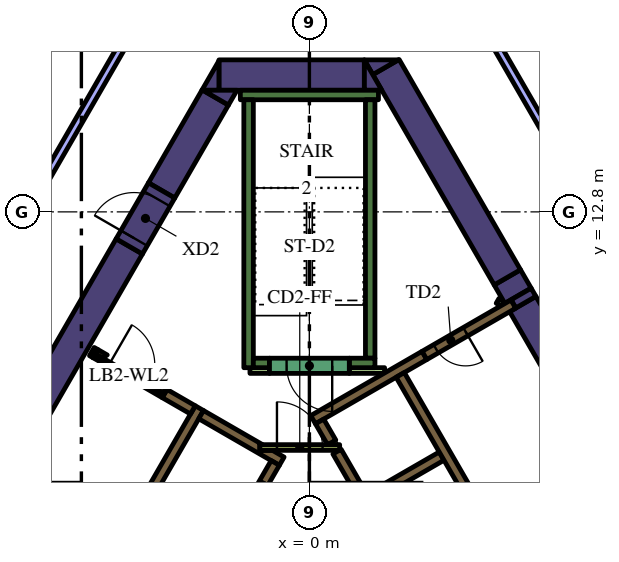
"""IFC4 building model, lengths in metres.
Left out: names, types, materials, properties, quantities, classifications, styles, units other than length and angle.
Written with IfcOpenShell. Run it as: python <this file> out.ifc"""

import sys

from ifc_helpers import new_model, si_unit, direction, frame, frame_2d, origin, place, context, subcontext, project, spatial, polyline, rectangle, outline, extrude, element, fill, save


model = new_model("IFC4")
c1 = context("Model", 3, precision=1e-05, world=origin(), true_north=direction((0.0, 1.0)))
c2 = subcontext(c1, "Body", "Model", "MODEL_VIEW")
j1 = project(units=[si_unit("LENGTHUNIT", "METRE"), si_unit("PLANEANGLEUNIT", "RADIAN")], contexts=[c1])
p1 = place(None, origin())
s1 = spatial("IfcSite", under=j1, at=p1, CompositionType="ELEMENT")
p2 = place(p1, origin())
s2 = spatial("IfcBuilding", under=s1, at=p2, CompositionType="ELEMENT")
p3 = place(p2, frame((0.0, 0.0, 141.6)))
s3 = spatial("IfcBuildingStorey", under=s2, at=p3, CompositionType="ELEMENT", Elevation=141.6)
p4 = place(p3, frame((5.489, 10.594, 0.0), z_axis=(0.0, 0.0, 1.0), x_axis=(-0.500000383388, 0.866025182435, 0.0)))
e1 = element("IfcWall", 1, at=p4, inside=s3, PredefinedType="SOLIDWALL", context=c2, shape_type="SweptSolid", body=[
    extrude(rectangle(XDim=0.558, YDim=0.8, at=frame_2d((0.279, 0.0))), origin(), (0.0, 0.0, 1.0), 4.2),
])
p5 = place(p3, frame((5.615, 10.375, 0.0), z_axis=(0.0, 0.0, 1.0), x_axis=(0.500002746266, -0.866023818221, 0.0)))
e2 = element("IfcWall", 2, at=p5, inside=s3, PredefinedType="SOLIDWALL", context=c2, shape_type="SweptSolid", body=[
    extrude(rectangle(XDim=5.328, YDim=0.8, at=frame_2d((2.664, 0.0))), origin(), (0.0, 0.0, 1.0), 4.2),
])
p6 = place(p3, origin())
e3 = element("IfcWall", 3, at=p6, inside=s3, PredefinedType="SOLIDWALL", context=c2, shape_type="SweptSolid", body=[
    extrude(outline(polyline([(5.432, 10.272), (5.308, 10.487), (5.836, 10.792), (5.96, 10.577), (5.432, 10.272)])), origin(), (0.0, 0.0, 1.0), 4.2),
])
p7 = place(p3, frame((5.209, 11.078, 0.0), z_axis=(0.0, 0.0, 1.0), x_axis=(-0.500035624827, 0.866004834804, 0.0)))
e4 = element("IfcWall", 4, at=p7, inside=s3, PredefinedType="SOLIDWALL", context=c2, shape_type="SweptSolid", body=[
    extrude(rectangle(XDim=6.388, YDim=0.8, at=frame_2d((3.194, 0.0))), origin(), (0.0, 0.0, 1.0), 4.2),
])
e5 = element("IfcWall", 5, at=p6, inside=s3, PredefinedType="SOLIDWALL", context=c2, shape_type="SweptSolid", body=[
    extrude(outline(polyline([(1.443, 16.8), (2.339, 16.8), (1.667, 16.412), (1.443, 16.8)])), origin(), (0.0, 0.0, 1.0), 4.2),
])
p8 = place(p3, frame((-2.379, 16.4, 0.0), z_axis=(0.0, 0.0, 1.0), x_axis=(1.0, 0.0, 0.0)))
e6 = element("IfcWall", 6, at=p8, inside=s3, PredefinedType="SOLIDWALL", context=c2, shape_type="SweptSolid", body=[
    extrude(rectangle(XDim=3.824, YDim=0.8, at=frame_2d((1.912, 0.0))), origin(), (0.0, 0.0, 1.0), 4.2),
])
e7 = element("IfcWall", 7, at=p6, inside=s3, PredefinedType="SOLIDWALL", context=c2, shape_type="SweptSolid", body=[
    extrude(outline(polyline([(1.905, 16.0), (1.447, 16.0), (1.447, 16.793), (1.905, 16.0)])), origin(), (0.0, 0.0, 1.0), 4.2),
])
e8 = element("IfcWall", 8, at=p6, inside=s3, PredefinedType="SOLIDWALL", context=c2, shape_type="SweptSolid", body=[
    extrude(outline(polyline([(-2.829, 16.0), (-2.381, 16.776), (-2.381, 16.0), (-2.829, 16.0)])), origin(), (0.0, 0.0, 1.0), 4.2),
])
p9 = place(p3, frame((-2.477, 15.81, 0.0), z_axis=(0.0, 0.0, 1.0), x_axis=(-0.499969377405, -0.866043083026, 0.0)))
e9 = element("IfcWall", 9, at=p9, inside=s3, PredefinedType="SOLIDWALL", context=c2, shape_type="SweptSolid", body=[
    extrude(rectangle(XDim=2.824, YDim=0.8, at=frame_2d((1.412, 0.0))), origin(), (0.0, 0.0, 1.0), 4.2),
])
e10 = element("IfcWall", 10, at=p6, inside=s3, PredefinedType="SOLIDWALL", context=c2, shape_type="SweptSolid", body=[
    extrude(outline(polyline([(-1.905, 16.0), (-2.129, 15.612), (-2.801, 16.0), (-1.905, 16.0)])), origin(), (0.0, 0.0, 1.0), 4.2),
])
p10 = place(p3, frame((-12.668, -1.842, 0.0), z_axis=(0.0, 0.0, 1.0), x_axis=(0.500003640647, 0.866023301845, 0.0)))
e11 = element("IfcWall", 11, at=p10, inside=s3, PredefinedType="SOLIDWALL", context=c2, shape_type="SweptSolid", body=[
    extrude(rectangle(XDim=15.858, YDim=0.8, at=frame_2d((7.929, 0.0))), origin(), (0.0, 0.0, 1.0), 4.2),
])
p11 = place(p3, frame((-1.817, 15.875, 0.0), z_axis=(0.0, 0.0, 1.0), x_axis=(1.0, 0.0, 0.0)))
e12 = element("IfcWall", 12, at=p11, inside=s3, PredefinedType="SOLIDWALL", context=c2, shape_type="SweptSolid", body=[
    extrude(rectangle(XDim=3.634, YDim=0.25, at=frame_2d((1.817, 0.0))), origin(), (0.0, 0.0, 1.0), 4.2),
])
p12 = place(p3, frame((1.6, 8.95, 0.0), z_axis=(0.0, 0.0, 1.0), x_axis=(0.0, 1.0, 0.0)))
e13 = element("IfcWall", 13, at=p12, inside=s3, PredefinedType="SOLIDWALL", context=c2, shape_type="SweptSolid", body=[
    extrude(rectangle(XDim=6.8, YDim=0.25, at=frame_2d((3.4, 0.0))), origin(), (0.0, 0.0, 1.0), 4.2),
])
p13 = place(p3, frame((1.05, 8.825, 0.0), z_axis=(0.0, 0.0, 1.0), x_axis=(1.0, 0.0, 0.0)))
e14 = element("IfcWall", 14, at=p13, inside=s3, PredefinedType="SOLIDWALL", context=c2, shape_type="SweptSolid", body=[
    extrude(rectangle(XDim=0.675, YDim=0.25, at=frame_2d((0.337, 0.0))), origin(), (0.0, 0.0, 1.0), 4.2),
])
p14 = place(p3, frame((-1.6, 8.7, 0.0), z_axis=(0.0, 0.0, 1.0), x_axis=(0.0, 1.0, 0.0)))
e15 = element("IfcWall", 15, at=p14, inside=s3, PredefinedType="SOLIDWALL", context=c2, shape_type="SweptSolid", body=[
    extrude(rectangle(XDim=7.05, YDim=0.25, at=frame_2d((3.525, 0.0))), origin(), (0.0, 0.0, 1.0), 4.2),
])
p15 = place(p3, frame((-1.475, 8.825, 0.0), z_axis=(0.0, 0.0, 1.0), x_axis=(1.0, 0.0, 0.0)))
e16 = element("IfcWall", 16, at=p15, inside=s3, PredefinedType="SOLIDWALL", context=c2, shape_type="SweptSolid", body=[
    extrude(rectangle(XDim=0.425, YDim=0.25, at=frame_2d((0.212, 0.0))), origin(), (0.0, 0.0, 1.0), 4.2),
])
p16 = place(p3, frame((3.028, 9.023, 0.0), z_axis=(0.0, 0.0, 1.0), x_axis=(-0.866036587186, -0.49998062928, 0.0)))
e17 = element("IfcWall", 17, at=p16, inside=s3, PredefinedType="SOLIDWALL", context=c2, shape_type="SweptSolid", body=[
    extrude(rectangle(XDim=3.384, YDim=0.25, at=frame_2d((1.692, 0.0))), origin(), (0.0, 0.0, 1.0), 4.2),
])
p17 = place(p3, frame((0.268, 7.285, 0.0), z_axis=(0.0, 0.0, 1.0), x_axis=(0.500098681536, -0.865968422476, 0.0)))
e18 = element("IfcWall", 18, at=p17, inside=s3, PredefinedType="SOLIDWALL", context=c2, shape_type="SweptSolid", body=[
    extrude(rectangle(XDim=0.636, YDim=0.25, at=frame_2d((0.318, 0.0))), origin(), (0.0, 0.0, 1.0), 4.2),
])
p18 = place(p3, frame((5.97, -2.591, 0.0), z_axis=(0.0, 0.0, 1.0), x_axis=(-0.499994469932, 0.866028596547, 0.0)))
e19 = element("IfcWall", 19, at=p18, inside=s3, PredefinedType="SOLIDWALL", context=c2, shape_type="SweptSolid", body=[
    extrude(rectangle(XDim=10.488, YDim=0.25, at=frame_2d((5.244, 0.0))), origin(), (0.0, 0.0, 1.0), 4.2),
])
p19 = place(p3, frame((1.574, 5.274, 0.0), z_axis=(0.0, 0.0, 1.0), x_axis=(0.866028486751, 0.499994660107, 0.0)))
e20 = element("IfcWall", 20, at=p19, inside=s3, PredefinedType="SOLIDWALL", context=c2, shape_type="SweptSolid", body=[
    extrude(rectangle(XDim=2.2, YDim=0.25, at=frame_2d((1.1, 0.0))), origin(), (0.0, 0.0, 1.0), 4.2),
])
p20 = place(p3, frame((-8.06, -1.311, 0.0), z_axis=(0.0, 0.0, 1.0), x_axis=(0.50000273126, 0.866023826885, 0.0)))
e21 = element("IfcWall", 21, at=p20, inside=s3, PredefinedType="SOLIDWALL", context=c2, shape_type="SweptSolid", body=[
    extrude(rectangle(XDim=10.33, YDim=0.25, at=frame_2d((5.165, 0.0))), origin(), (0.0, 0.0, 1.0), 4.2),
])
e22 = element("IfcWall", 22, at=p6, inside=s3, PredefinedType="SOLIDWALL", context=c2, shape_type="SweptSolid", body=[
    extrude(outline(polyline([(-2.912, 7.356), (-2.787, 7.573), (-1.232, 6.675), (-1.303, 6.675), (-1.304, 6.675), (-1.304, 6.675), (-1.304, 6.525), (-1.304, 6.525), (-1.303, 6.525), (-0.971, 6.525), (-0.665, 6.348), (-0.79, 6.132), (-1.007, 6.257), (-1.007, 6.257), (-2.912, 7.356)])), origin(), (0.0, 0.0, 1.0), 4.2),
])
p21 = place(p3, frame((-5.725, 9.125, 0.0), z_axis=(0.0, 0.0, 1.0), x_axis=(0.866185586049, -0.49972245349, 0.0)))
e23 = element("IfcWall", 23, at=p21, inside=s3, PredefinedType="SOLIDWALL", context=c2, shape_type="SweptSolid", body=[
    extrude(rectangle(XDim=0.11, YDim=0.25, at=frame_2d((0.055, 0.0))), origin(), (0.0, 0.0, 1.0), 4.2),
])
p22 = place(p3, frame((-3.066, 7.59, 0.0), z_axis=(0.0, 0.0, 1.0), x_axis=(-0.866081358704, 0.49990307071, 0.0)))
e24 = element("IfcWall", 24, at=p22, inside=s3, PredefinedType="SOLIDWALL", context=c2, shape_type="SweptSolid", body=[
    extrude(rectangle(XDim=0.858, YDim=0.25, at=frame_2d((0.429, 0.0))), origin(), (0.0, 0.0, 1.0), 4.2),
])
e25 = element("IfcWall", 25, at=p6, inside=s3, PredefinedType="SOLIDWALL", context=c2, shape_type="SweptSolid", body=[
    extrude(outline(polyline([(-3.748, 8.128), (-3.813, 8.015), (-4.027, 8.139), (-4.017, 8.156), (-4.008, 8.173), (-4.0, 8.192), (-3.995, 8.21), (-3.991, 8.23), (-3.99, 8.25), (-3.99, 8.268), (-3.748, 8.128)])), origin(), (0.0, 0.0, 1.0), 4.2),
])
e26 = element("IfcWall", 26, at=p6, inside=s3, PredefinedType="SOLIDWALL", context=c2, shape_type="SweptSolid", body=[
    extrude(outline(polyline([(-5.689, 8.96), (-5.69, 8.961), (-5.565, 9.177), (-5.319, 9.035), (-5.335, 9.026), (-5.351, 9.015), (-5.366, 9.002), (-5.379, 8.988), (-5.392, 8.972), (-5.402, 8.956), (-5.412, 8.939), (-5.629, 9.064), (-5.629, 9.064), (-5.689, 8.96)])), origin(), (0.0, 0.0, 1.0), 4.2),
])
p23 = place(p3, frame((1.05, 8.625, 0.0), z_axis=(0.0, 0.0, 1.0), x_axis=(1.0, 0.0, 0.0)))
e27 = element("IfcWall", 27, at=p23, inside=s3, PredefinedType="PARTITIONING", context=c2, shape_type="SweptSolid", body=[
    extrude(rectangle(XDim=0.929, YDim=0.15, at=frame_2d((0.464, 0.0))), origin(), (0.0, 0.0, 1.0), 3.15),
])
p24 = place(p3, frame((-1.564, 8.625, 0.0), z_axis=(0.0, 0.0, 1.0), x_axis=(1.0, 0.0, 0.0)))
e28 = element("IfcWall", 28, at=p24, inside=s3, PredefinedType="PARTITIONING", context=c2, shape_type="SweptSolid", body=[
    extrude(rectangle(XDim=0.514, YDim=0.15, at=frame_2d((0.257, 0.0))), origin(), (0.0, 0.0, 1.0), 3.15),
])
p25 = place(p3, frame((4.98, 10.358, 0.0), z_axis=(0.0, 0.0, 1.0), x_axis=(0.500640202437, 0.86565546709, 0.0)))
e29 = element("IfcWall", 29, at=p25, inside=s3, PredefinedType="PARTITIONING", context=c2, shape_type="SweptSolid", body=[
    extrude(rectangle(XDim=0.146, YDim=0.15, at=frame_2d((0.073, 0.0))), origin(), (0.0, 0.0, 1.0), 3.15),
])
p26 = place(p3, frame((8.565, -2.185, 0.0), z_axis=(0.0, 0.0, 1.0), x_axis=(-0.499997954832, 0.866026584559, 0.0)))
e30 = element("IfcWall", 30, at=p26, inside=s3, PredefinedType="SOLIDWALL", context=c2, shape_type="SweptSolid", body=[
    extrude(rectangle(XDim=12.35, YDim=0.25, at=frame_2d((6.175, 0.0))), origin(), (0.0, 0.0, 1.0), 4.2),
])
p27 = place(p26, frame((0.585, 0.0, 0.0)))
e31 = element("IfcOpeningElement", 31, at=p27, cuts=e30, PredefinedType="OPENING", context=c2, shape_type="SweptSolid", body=[
    extrude(rectangle(XDim=1.1, YDim=2.1, at=frame_2d((0.55, 1.05))), frame((0.0, 0.135, 0.0), z_axis=(0.0, -1.0, 0.0), x_axis=(1.0, 0.0, 0.0)), (0.0, 0.0, 1.0), 0.27),
])
p28 = place(p3, frame((-0.898, 6.194, 0.0), z_axis=(0.0, 0.0, 1.0), x_axis=(-0.499996202215, -0.866027596426, 0.0)))
e32 = element("IfcWall", 32, at=p28, inside=s3, PredefinedType="SOLIDWALL", context=c2, shape_type="SweptSolid", body=[
    extrude(rectangle(XDim=9.83, YDim=0.25, at=frame_2d((4.915, 0.0))), origin(), (0.0, 0.0, 1.0), 4.2),
])
p29 = place(p28, frame((0.585, 0.0, 0.0)))
e33 = element("IfcOpeningElement", 33, at=p29, cuts=e32, PredefinedType="OPENING", context=c2, shape_type="SweptSolid", body=[
    extrude(rectangle(XDim=1.1, YDim=2.1, at=frame_2d((0.55, 1.05))), frame((0.0, 0.135, 0.0), z_axis=(0.0, -1.0, 0.0), x_axis=(1.0, 0.0, 0.0)), (0.0, 0.0, 1.0), 0.27),
])
p30 = place(p28, frame((3.105, 0.0, 0.0)))
e34 = element("IfcOpeningElement", 34, at=p30, cuts=e32, PredefinedType="OPENING", context=c2, shape_type="SweptSolid", body=[
    extrude(rectangle(XDim=1.1, YDim=2.1, at=frame_2d((0.55, 1.05))), frame((0.0, 0.135, 0.0), z_axis=(0.0, -1.0, 0.0), x_axis=(1.0, 0.0, 0.0)), (0.0, 0.0, 1.0), 0.27),
])
p31 = place(p28, frame((5.625, 0.0, 0.0)))
e35 = element("IfcOpeningElement", 35, at=p31, cuts=e32, PredefinedType="OPENING", context=c2, shape_type="SweptSolid", body=[
    extrude(rectangle(XDim=1.1, YDim=2.1, at=frame_2d((0.55, 1.05))), frame((0.0, 0.135, 0.0), z_axis=(0.0, -1.0, 0.0), x_axis=(1.0, 0.0, 0.0)), (0.0, 0.0, 1.0), 0.27),
])
p32 = place(p28, frame((8.145, 0.0, 0.0)))
e36 = element("IfcOpeningElement", 36, at=p32, cuts=e32, PredefinedType="OPENING", context=c2, shape_type="SweptSolid", body=[
    extrude(rectangle(XDim=1.1, YDim=2.1, at=frame_2d((0.55, 1.05))), frame((0.0, 0.135, 0.0), z_axis=(0.0, -1.0, 0.0), x_axis=(1.0, 0.0, 0.0)), (0.0, 0.0, 1.0), 0.27),
])
p33 = place(p3, frame((1.05, 8.75, 0.0), z_axis=(0.0, 0.0, 1.0), x_axis=(-1.0, 0.0, 0.0)))
e37 = element("IfcWall", 37, at=p33, inside=s3, PredefinedType="SOLIDWALL", context=c2, shape_type="SweptSolid", body=[
    extrude(rectangle(XDim=2.1, YDim=0.4, at=frame_2d((1.05, 0.0))), origin(), (0.0, 0.0, 1.0), 4.2),
])
p34 = place(p33, frame((0.45, 0.0, 0.0)))
e38 = element("IfcOpeningElement", 38, at=p34, cuts=e37, PredefinedType="OPENING", context=c2, shape_type="SweptSolid", body=[
    extrude(rectangle(XDim=1.2, YDim=2.1, at=frame_2d((0.6, 1.05))), frame((0.0, 0.21, 0.0), z_axis=(0.0, -1.0, 0.0), x_axis=(1.0, 0.0, 0.0)), (0.0, 0.0, 1.0), 0.42),
])
p35 = place(p3, frame((5.366, 10.373, 0.0), z_axis=(0.0, 0.0, 1.0), x_axis=(-0.866019956843, -0.50000943426, 0.0)))
e39 = element("IfcWall", 39, at=p35, inside=s3, PredefinedType="SOLIDWALL", context=c2, shape_type="SweptSolid", body=[
    extrude(rectangle(XDim=2.7, YDim=0.25, at=frame_2d((1.35, 0.0))), origin(), (0.0, 0.0, 1.0), 4.2),
])
p36 = place(p35, frame((1.45, 0.0, 0.0)))
e40 = element("IfcOpeningElement", 40, at=p36, cuts=e39, PredefinedType="OPENING", context=c2, shape_type="SweptSolid", body=[
    extrude(rectangle(XDim=0.9, YDim=2.1, at=frame_2d((0.45, 1.05))), frame((0.0, 0.135, 0.0), z_axis=(0.0, -1.0, 0.0), x_axis=(1.0, 0.0, 0.0)), (0.0, 0.0, 1.0), 0.27),
])
p37 = place(p3, frame((-1.303, 6.6, 0.0), z_axis=(0.0, 0.0, 1.0), x_axis=(1.0, 0.0, 0.0)))
e41 = element("IfcWall", 41, at=p37, inside=s3, PredefinedType="PARTITIONING", context=c2, shape_type="SweptSolid", body=[
    extrude(rectangle(XDim=2.1, YDim=0.15, at=frame_2d((1.05, 0.0))), origin(), (0.0, 0.0, 1.0), 4.2),
])
p38 = place(p37, frame((0.45, 0.0, 0.0)))
e42 = element("IfcOpeningElement", 42, at=p38, cuts=e41, PredefinedType="OPENING", context=c2, shape_type="SweptSolid", body=[
    extrude(rectangle(XDim=1.2, YDim=2.1, at=frame_2d((0.6, 1.05))), frame((0.0, 0.085, 0.0), z_axis=(0.0, -1.0, 0.0), x_axis=(1.0, 0.0, 0.0)), (0.0, 0.0, 1.0), 0.17),
])
p39 = place(p3, frame((-5.659, 9.012, 0.0), z_axis=(0.0, 0.0, 1.0), x_axis=(0.866009402589, -0.500027713859, 0.0)))
e43 = element("IfcWall", 43, at=p39, inside=s3, PredefinedType="PARTITIONING", context=c2, shape_type="SweptSolid", body=[
    extrude(rectangle(XDim=2.1, YDim=0.12, at=frame_2d((1.05, 0.0))), origin(), (0.0, 0.0, 1.0), 3.15),
])
p40 = place(p39, frame((0.45, 0.0, 0.0)))
e44 = element("IfcOpeningElement", 44, at=p40, cuts=e43, PredefinedType="OPENING", context=c2, shape_type="SweptSolid", body=[
    extrude(rectangle(XDim=1.2, YDim=2.1, at=frame_2d((0.6, 1.05))), frame((0.0, 0.07, 0.0), z_axis=(0.0, -1.0, 0.0), x_axis=(1.0, 0.0, 0.0)), (0.0, 0.0, 1.0), 0.14),
])
p41 = place(p3, frame((-4.739, 11.892, 0.0), z_axis=(0.0, 0.0, 1.0), x_axis=(0.500062241894, 0.865989465428, 0.0)))
e45 = element("IfcWall", 45, at=p41, inside=s3, PredefinedType="SOLIDWALL", context=c2, shape_type="SweptSolid", body=[
    extrude(rectangle(XDim=1.7, YDim=0.8, at=frame_2d((0.85, 0.0))), origin(), (0.0, 0.0, 1.0), 4.2),
])
p42 = place(p41, frame((0.25, 0.0, 0.0)))
e46 = element("IfcOpeningElement", 46, at=p42, cuts=e45, PredefinedType="OPENING", context=c2, shape_type="SweptSolid", body=[
    extrude(rectangle(XDim=1.2, YDim=2.1, at=frame_2d((0.6, 1.05))), frame((0.0, 0.41, 0.0), z_axis=(0.0, -1.0, 0.0), x_axis=(1.0, 0.0, 0.0)), (0.0, 0.0, 1.0), 0.82),
])
p43 = place(p3, frame((8.611, 10.785, 0.0), z_axis=(0.0, 0.0, 1.0), x_axis=(-0.499987928593, 0.866032373102, 0.0)))
e47 = element("IfcWall", 47, at=p43, inside=s3, PredefinedType="PARTITIONING", context=c2, shape_type="SweptSolid", body=[
    extrude(rectangle(XDim=8.889, YDim=0.2, at=frame_2d((4.445, 0.0))), origin(), (0.0, 0.0, 1.0), 3.15),
])
p44 = place(p3, frame((-6.658, 20.96, 0.0), z_axis=(0.0, 0.0, 1.0), x_axis=(-0.551907039463, -0.833905642019, 0.0)))
e48 = element("IfcWall", 48, at=p44, inside=s3, PredefinedType="PARTITIONING", context=c2, shape_type="SweptSolid", body=[
    extrude(rectangle(XDim=5.412, YDim=0.15, at=frame_2d((2.706, 0.0))), origin(), (0.0, 0.0, 1.0), 3.15),
])
p45 = place(p3, frame((-4.167, 18.483, 0.0), z_axis=(0.0, 0.0, 1.0), x_axis=(-0.499974340325, -0.866040217898, 0.0)))
e49 = element("IfcWall", 49, at=p45, inside=s3, PredefinedType="PARTITIONING", context=c2, shape_type="SweptSolid", body=[
    extrude(rectangle(XDim=8.894, YDim=0.2, at=frame_2d((4.447, 0.0))), origin(), (0.0, 0.0, 1.0), 3.15),
])
p46 = place(p29, origin())
e50 = element("IfcDoor", 50, at=p46, inside=s3, OperationType="DOUBLE_DOOR_SLIDING", PredefinedType="DOOR", context=c2, shape_type="SweptSolid", body=[
    extrude(rectangle(XDim=1.1, YDim=2.1, at=frame_2d((0.55, 1.05))), frame((0.0, 0.025, 0.0), z_axis=(0.0, -1.0, 0.0), x_axis=(1.0, 0.0, 0.0)), (0.0, 0.0, 1.0), 0.05),
])
fill(e33, e50)
p47 = place(p34, origin())
e51 = element("IfcDoor", 51, at=p47, inside=s3, OperationType="SINGLE_SWING_LEFT", PredefinedType="DOOR", context=c2, shape_type="SweptSolid", body=[
    extrude(rectangle(XDim=1.2, YDim=2.1, at=frame_2d((0.6, 1.05))), frame((0.0, 0.025, 0.0), z_axis=(0.0, -1.0, 0.0), x_axis=(1.0, 0.0, 0.0)), (0.0, 0.0, 1.0), 0.05),
])
fill(e38, e51)
p48 = place(p36, origin())
e52 = element("IfcDoor", 52, at=p48, inside=s3, OperationType="SINGLE_SWING_LEFT", PredefinedType="DOOR", context=c2, shape_type="SweptSolid", body=[
    extrude(rectangle(XDim=0.9, YDim=2.1, at=frame_2d((0.45, 1.05))), frame((0.0, 0.025, 0.0), z_axis=(0.0, -1.0, 0.0), x_axis=(1.0, 0.0, 0.0)), (0.0, 0.0, 1.0), 0.05),
])
fill(e40, e52)
p49 = place(p38, origin())
e53 = element("IfcDoor", 53, at=p49, inside=s3, OperationType="SINGLE_SWING_LEFT", PredefinedType="DOOR", context=c2, shape_type="SweptSolid", body=[
    extrude(rectangle(XDim=1.2, YDim=2.1, at=frame_2d((0.6, 1.05))), frame((0.0, 0.025, 0.0), z_axis=(0.0, -1.0, 0.0), x_axis=(1.0, 0.0, 0.0)), (0.0, 0.0, 1.0), 0.05),
])
fill(e42, e53)
p50 = place(p40, origin())
e54 = element("IfcDoor", 54, at=p50, inside=s3, OperationType="SINGLE_SWING_LEFT", PredefinedType="DOOR", context=c2, shape_type="SweptSolid", body=[
    extrude(rectangle(XDim=1.2, YDim=2.1, at=frame_2d((0.6, 1.05))), frame((0.0, 0.025, 0.0), z_axis=(0.0, -1.0, 0.0), x_axis=(1.0, 0.0, 0.0)), (0.0, 0.0, 1.0), 0.05),
])
fill(e44, e54)
p51 = place(p42, origin())
e55 = element("IfcDoor", 55, at=p51, inside=s3, OperationType="SINGLE_SWING_LEFT", PredefinedType="DOOR", context=c2, shape_type="SweptSolid", body=[
    extrude(rectangle(XDim=1.2, YDim=2.1, at=frame_2d((0.6, 1.05))), frame((0.0, 0.025, 0.0), z_axis=(0.0, -1.0, 0.0), x_axis=(1.0, 0.0, 0.0)), (0.0, 0.0, 1.0), 0.05),
])
fill(e46, e55)
save(model, sys.argv[1])
